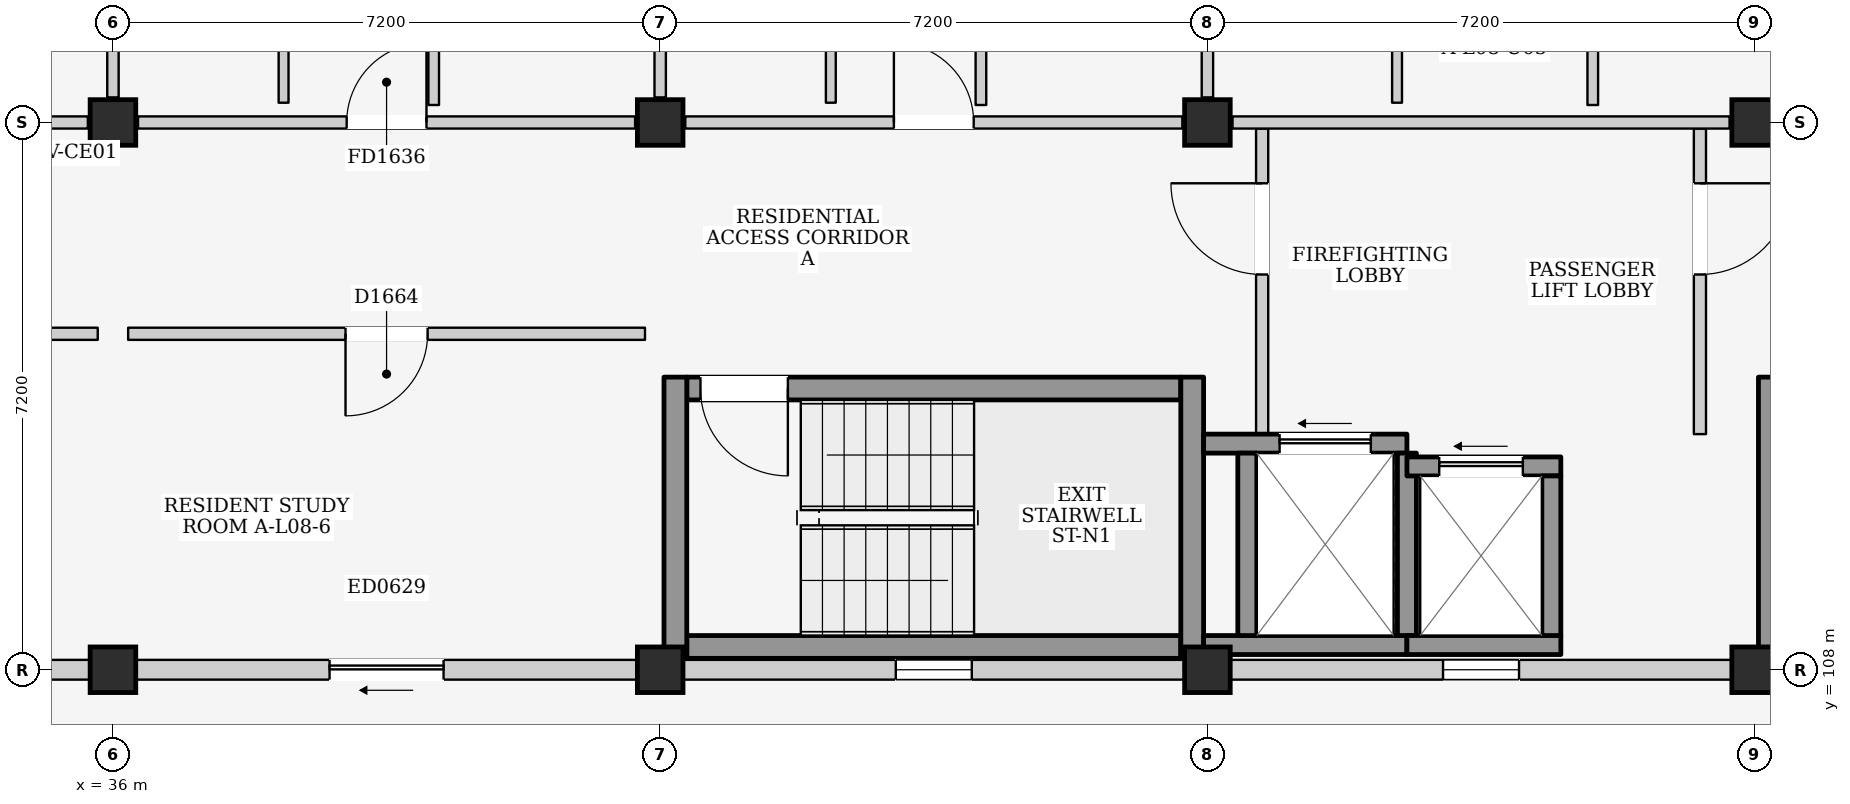
"""IFC4 building model, lengths in metres.
Left out: names, types, materials, properties, quantities, classifications, styles, units other than length and angle.
Written with IfcOpenShell. Run it as: python <this file> out.ifc"""

import sys

from ifc_helpers import new_model, si_unit, direction, frame, frame_2d, origin, origin_2d, place, context, subcontext, project, spatial, rectangle, extrude, element, fill, save


model = new_model("IFC4")
c1 = context("Model", 3, precision=1e-05, world=origin(), true_north=direction((0.0, 1.0)))
c2 = subcontext(c1, "Body", "Model", "MODEL_VIEW")
j1 = project(units=[si_unit("LENGTHUNIT", "METRE"), si_unit("PLANEANGLEUNIT", "RADIAN")], contexts=[c1])
p1 = place(None, origin())
s1 = spatial("IfcSite", under=j1, at=p1, CompositionType="ELEMENT")
p2 = place(p1, origin())
s2 = spatial("IfcBuilding", under=s1, at=p2, CompositionType="ELEMENT")
p3 = place(p2, frame((0.0, 0.0, 28.3)))
s3 = spatial("IfcBuildingStorey", under=s2, at=p3, CompositionType="ELEMENT", Elevation=28.3)
for number, where, z_axis, x_axis in (
    (1, (36.0, 108.0, 0.0), (0.0, 0.0, 1.0), (1.0, 0.0, 0.0)),
    (2, (36.0, 115.2, 0.0), (0.0, 0.0, 1.0), (1.0, 0.0, 0.0)),
    (3, (43.2, 108.0, 0.0), (0.0, 0.0, 1.0), (1.0, 0.0, 0.0)),
    (4, (43.2, 115.2, 0.0), (0.0, 0.0, 1.0), (1.0, 0.0, 0.0)),
    (5, (50.4, 108.0, 0.0), (0.0, 0.0, 1.0), (1.0, 0.0, 0.0)),
    (6, (50.4, 115.2, 0.0), (0.0, 0.0, 1.0), (1.0, 0.0, 0.0)),
    (7, (57.6, 108.0, 0.0), (0.0, 0.0, 1.0), (1.0, 0.0, 0.0)),
    (8, (57.6, 115.2, 0.0), (0.0, 0.0, 1.0), (1.0, 0.0, 0.0)),
):
    element("IfcColumn", number, at=place(p3, frame(where, z_axis=z_axis, x_axis=x_axis)), inside=s3, PredefinedType="COLUMN", context=c2, shape_type="SweptSolid", body=[
        extrude(rectangle(XDim=0.6, YDim=0.6, at=origin_2d()), origin(), (0.0, 0.0, 1.0), 3.2),
    ])
p4 = place(p3, frame((29.1, 108.0, 0.0), z_axis=(0.0, 0.0, 1.0), x_axis=(1.0, 0.0, 0.0)))
e9 = element("IfcWall", 9, at=p4, inside=s3, PredefinedType="ELEMENTEDWALL", context=c2, shape_type="SweptSolid", body=[
    extrude(rectangle(XDim=6.6, YDim=0.26, at=frame_2d((3.3, 0.0))), origin(), (0.0, 0.0, 1.0), 2.285),
])
p5 = place(p4, frame((2.55, 0.0, 0.0)))
e10 = element("IfcOpeningElement", 10, at=p5, cuts=e9, PredefinedType="OPENING", context=c2, shape_type="SweptSolid", body=[
    extrude(rectangle(XDim=1.5, YDim=2.12, at=frame_2d((0.75, 1.06))), frame((0.0, 0.145, 0.0), z_axis=(0.0, -1.0, 0.0), x_axis=(1.0, 0.0, 0.0)), (0.0, 0.0, 1.0), 0.29),
])
p6 = place(p3, frame((36.3, 108.0, 0.0), z_axis=(0.0, 0.0, 1.0), x_axis=(1.0, 0.0, 0.0)))
e11 = element("IfcWall", 11, at=p6, inside=s3, PredefinedType="ELEMENTEDWALL", context=c2, shape_type="SweptSolid", body=[
    extrude(rectangle(XDim=6.6, YDim=0.26, at=frame_2d((3.3, 0.0))), origin(), (0.0, 0.0, 1.0), 2.285),
])
p7 = place(p6, frame((2.55, 0.0, 0.0)))
e12 = element("IfcOpeningElement", 12, at=p7, cuts=e11, PredefinedType="OPENING", context=c2, shape_type="SweptSolid", body=[
    extrude(rectangle(XDim=1.5, YDim=2.12, at=frame_2d((0.75, 1.06))), frame((0.0, 0.145, 0.0), z_axis=(0.0, -1.0, 0.0), x_axis=(1.0, 0.0, 0.0)), (0.0, 0.0, 1.0), 0.29),
])
p8 = place(p3, frame((43.5, 108.0, 0.0), z_axis=(0.0, 0.0, 1.0), x_axis=(1.0, 0.0, 0.0)))
e13 = element("IfcWall", 13, at=p8, inside=s3, PredefinedType="ELEMENTEDWALL", context=c2, shape_type="SweptSolid", body=[
    extrude(rectangle(XDim=6.6, YDim=0.26, at=frame_2d((3.3, 0.0))), origin(), (0.0, 0.0, 1.0), 2.285),
])
p9 = place(p8, frame((2.8, 0.0, 1.2)))
e14 = element("IfcOpeningElement", 14, at=p9, cuts=e13, PredefinedType="OPENING", context=c2, shape_type="SweptSolid", body=[
    extrude(rectangle(XDim=1.0, YDim=0.9, at=frame_2d((0.5, 0.45))), frame((0.0, 0.145, 0.0), z_axis=(0.0, -1.0, 0.0), x_axis=(1.0, 0.0, 0.0)), (0.0, 0.0, 1.0), 0.29),
])
p10 = place(p3, frame((50.7, 108.0, 0.0), z_axis=(0.0, 0.0, 1.0), x_axis=(1.0, 0.0, 0.0)))
e15 = element("IfcWall", 15, at=p10, inside=s3, PredefinedType="ELEMENTEDWALL", context=c2, shape_type="SweptSolid", body=[
    extrude(rectangle(XDim=6.6, YDim=0.26, at=frame_2d((3.3, 0.0))), origin(), (0.0, 0.0, 1.0), 2.285),
])
p11 = place(p10, frame((2.8, 0.0, 1.2)))
e16 = element("IfcOpeningElement", 16, at=p11, cuts=e15, PredefinedType="OPENING", context=c2, shape_type="SweptSolid", body=[
    extrude(rectangle(XDim=1.0, YDim=0.9, at=frame_2d((0.5, 0.45))), frame((0.0, 0.145, 0.0), z_axis=(0.0, -1.0, 0.0), x_axis=(1.0, 0.0, 0.0)), (0.0, 0.0, 1.0), 0.29),
])
p12 = place(p3, frame((43.55, 108.3, 0.0), z_axis=(0.0, 0.0, 1.0), x_axis=(1.0, 0.0, 0.0)))
e17 = element("IfcWall", 17, at=p12, inside=s3, PredefinedType="SHEAR", context=c2, shape_type="SweptSolid", body=[
    extrude(rectangle(XDim=6.5, YDim=0.3, at=frame_2d((3.25, 0.0))), origin(), (0.0, 0.0, 1.0), 2.95),
])
p13 = place(p3, frame((43.55, 111.7, 0.0), z_axis=(0.0, 0.0, 1.0), x_axis=(1.0, 0.0, 0.0)))
e18 = element("IfcWall", 18, at=p13, inside=s3, PredefinedType="SHEAR", context=c2, shape_type="SweptSolid", body=[
    extrude(rectangle(XDim=6.5, YDim=0.3, at=frame_2d((3.25, 0.0))), origin(), (0.0, 0.0, 1.0), 2.95),
])
p14 = place(p13, frame((0.18, 0.0, 0.0)))
e19 = element("IfcOpeningElement", 19, at=p14, cuts=e18, PredefinedType="OPENING", context=c2, shape_type="SweptSolid", body=[
    extrude(rectangle(XDim=1.15, YDim=2.2, at=frame_2d((0.575, 1.1))), frame((0.0, 0.165, 0.0), z_axis=(0.0, -1.0, 0.0), x_axis=(1.0, 0.0, 0.0)), (0.0, 0.0, 1.0), 0.33),
])
for number, where, z_axis, x_axis in (
    (20, (43.4, 108.15, 0.0), (0.0, 0.0, 1.0), (0.0, 1.0, 0.0)),
    (21, (50.2, 108.15, 0.0), (0.0, 0.0, 1.0), (0.0, 1.0, 0.0)),
):
    element("IfcWall", number, at=place(p3, frame(where, z_axis=z_axis, x_axis=x_axis)), inside=s3, PredefinedType="SHEAR", context=c2, shape_type="SweptSolid", body=[
        extrude(rectangle(XDim=3.7, YDim=0.3, at=frame_2d((1.85, 0.0))), origin(), (0.0, 0.0, 1.0), 2.95),
    ])
p15 = place(p3, frame((51.12, 111.1, 0.0), z_axis=(0.0, 0.0, 1.0), x_axis=(0.0, 1.0, 0.0)))
e22 = element("IfcWall", 22, at=p15, inside=s3, PredefinedType="PARTITIONING", context=c2, shape_type="SweptSolid", body=[
    extrude(rectangle(XDim=4.02, YDim=0.16, at=frame_2d((2.01, 0.0))), origin(), (0.0, 0.0, 1.0), 2.95),
])
p16 = place(p15, frame((2.1, 0.0, 0.0)))
e23 = element("IfcOpeningElement", 23, at=p16, cuts=e22, PredefinedType="OPENING", context=c2, shape_type="SweptSolid", body=[
    extrude(rectangle(XDim=1.2, YDim=2.2, at=frame_2d((0.6, 1.1))), frame((0.0, 0.095, 0.0), z_axis=(0.0, -1.0, 0.0), x_axis=(1.0, 0.0, 0.0)), (0.0, 0.0, 1.0), 0.19),
])
p17 = place(p3, frame((56.88, 111.1, 0.0), z_axis=(0.0, 0.0, 1.0), x_axis=(0.0, 1.0, 0.0)))
e24 = element("IfcWall", 24, at=p17, inside=s3, PredefinedType="PARTITIONING", context=c2, shape_type="SweptSolid", body=[
    extrude(rectangle(XDim=4.02, YDim=0.16, at=frame_2d((2.01, 0.0))), origin(), (0.0, 0.0, 1.0), 2.95),
])
p18 = place(p17, frame((2.1, 0.0, 0.0)))
e25 = element("IfcOpeningElement", 25, at=p18, cuts=e24, PredefinedType="OPENING", context=c2, shape_type="SweptSolid", body=[
    extrude(rectangle(XDim=1.2, YDim=2.2, at=frame_2d((0.6, 1.1))), frame((0.0, 0.095, 0.0), z_axis=(0.0, -1.0, 0.0), x_axis=(1.0, 0.0, 0.0)), (0.0, 0.0, 1.0), 0.19),
])
p19 = place(p3, frame((50.35, 108.325, 0.0), z_axis=(0.0, 0.0, 1.0), x_axis=(1.0, 0.0, 0.0)))
e26 = element("IfcWall", 26, at=p19, inside=s3, PredefinedType="SHEAR", context=c2, shape_type="SweptSolid", body=[
    extrude(rectangle(XDim=2.675, YDim=0.25, at=frame_2d((1.337, 0.0))), origin(), (0.0, 0.0, 1.0), 2.95),
])
p20 = place(p3, frame((50.35, 110.975, 0.0), z_axis=(0.0, 0.0, 1.0), x_axis=(1.0, 0.0, 0.0)))
e27 = element("IfcWall", 27, at=p20, inside=s3, PredefinedType="SHEAR", context=c2, shape_type="SweptSolid", body=[
    extrude(rectangle(XDim=2.675, YDim=0.25, at=frame_2d((1.337, 0.0))), origin(), (0.0, 0.0, 1.0), 2.95),
])
p21 = place(p20, frame((1.0, 0.0, 0.0)))
e28 = element("IfcOpeningElement", 28, at=p21, cuts=e27, PredefinedType="OPENING", context=c2, shape_type="SweptSolid", body=[
    extrude(rectangle(XDim=1.2, YDim=2.25, at=frame_2d((0.6, 1.125))), frame((0.0, 0.14, 0.0), z_axis=(0.0, -1.0, 0.0), x_axis=(1.0, 0.0, 0.0)), (0.0, 0.0, 1.0), 0.28),
])
for number, where, z_axis, x_axis in (
    (29, (50.925, 108.45, 0.0), (0.0, 0.0, 1.0), (0.0, 1.0, 0.0)),
    (30, (53.025, 108.45, 0.0), (0.0, 0.0, 1.0), (0.0, 1.0, 0.0)),
):
    element("IfcWall", number, at=place(p3, frame(where, z_axis=z_axis, x_axis=x_axis)), inside=s3, PredefinedType="SHEAR", context=c2, shape_type="SweptSolid", body=[
        extrude(rectangle(XDim=2.4, YDim=0.25, at=frame_2d((1.2, 0.0))), origin(), (0.0, 0.0, 1.0), 2.95),
    ])
p22 = place(p3, frame((53.025, 108.325, 0.0), z_axis=(0.0, 0.0, 1.0), x_axis=(1.0, 0.0, 0.0)))
e31 = element("IfcWall", 31, at=p22, inside=s3, PredefinedType="SHEAR", context=c2, shape_type="SweptSolid", body=[
    extrude(rectangle(XDim=2.025, YDim=0.25, at=frame_2d((1.013, 0.0))), origin(), (0.0, 0.0, 1.0), 2.95),
])
p23 = place(p3, frame((53.025, 110.675, 0.0), z_axis=(0.0, 0.0, 1.0), x_axis=(1.0, 0.0, 0.0)))
e32 = element("IfcWall", 32, at=p23, inside=s3, PredefinedType="SHEAR", context=c2, shape_type="SweptSolid", body=[
    extrude(rectangle(XDim=2.025, YDim=0.25, at=frame_2d((1.013, 0.0))), origin(), (0.0, 0.0, 1.0), 2.95),
])
p24 = place(p23, frame((0.425, 0.0, 0.0)))
e33 = element("IfcOpeningElement", 33, at=p24, cuts=e32, PredefinedType="OPENING", context=c2, shape_type="SweptSolid", body=[
    extrude(rectangle(XDim=1.1, YDim=2.15, at=frame_2d((0.55, 1.075))), frame((0.0, 0.14, 0.0), z_axis=(0.0, -1.0, 0.0), x_axis=(1.0, 0.0, 0.0)), (0.0, 0.0, 1.0), 0.28),
])
p25 = place(p3, frame((54.925, 108.45, 0.0), z_axis=(0.0, 0.0, 1.0), x_axis=(0.0, 1.0, 0.0)))
e34 = element("IfcWall", 34, at=p25, inside=s3, PredefinedType="SHEAR", context=c2, shape_type="SweptSolid", body=[
    extrude(rectangle(XDim=2.1, YDim=0.25, at=frame_2d((1.05, 0.0))), origin(), (0.0, 0.0, 1.0), 2.95),
])
p26 = place(p3, frame((57.8, 108.15, 0.0), z_axis=(0.0, 0.0, 1.0), x_axis=(0.0, 1.0, 0.0)))
e35 = element("IfcWall", 35, at=p26, inside=s3, PredefinedType="SHEAR", context=c2, shape_type="SweptSolid", body=[
    extrude(rectangle(XDim=3.7, YDim=0.3, at=frame_2d((1.85, 0.0))), origin(), (0.0, 0.0, 1.0), 2.95),
])
p27 = place(p3, frame((29.13, 115.2, 0.0), z_axis=(0.0, 0.0, 1.0), x_axis=(1.0, 0.0, 0.0)))
e36 = element("IfcWall", 36, at=p27, inside=s3, PredefinedType="PARTITIONING", context=c2, shape_type="SweptSolid", body=[
    extrude(rectangle(XDim=6.54, YDim=0.16, at=frame_2d((3.27, 0.0))), origin(), (0.0, 0.0, 1.0), 2.285),
])
p28 = place(p3, frame((36.0, 115.53, 0.0), z_axis=(0.0, 0.0, 1.0), x_axis=(0.0, 1.0, 0.0)))
e37 = element("IfcWall", 37, at=p28, inside=s3, PredefinedType="PARTITIONING", context=c2, shape_type="SweptSolid", body=[
    extrude(rectangle(XDim=6.54, YDim=0.15, at=frame_2d((3.27, 0.0))), origin(), (0.0, 0.0, 1.0), 2.435),
])
p29 = place(p3, frame((36.33, 115.2, 0.0), z_axis=(0.0, 0.0, 1.0), x_axis=(1.0, 0.0, 0.0)))
e38 = element("IfcWall", 38, at=p29, inside=s3, PredefinedType="PARTITIONING", context=c2, shape_type="SweptSolid", body=[
    extrude(rectangle(XDim=6.54, YDim=0.16, at=frame_2d((3.27, 0.0))), origin(), (0.0, 0.0, 1.0), 2.285),
])
p30 = place(p29, frame((2.745, 0.0, 0.0)))
e39 = element("IfcOpeningElement", 39, at=p30, cuts=e38, PredefinedType="OPENING", context=c2, shape_type="SweptSolid", body=[
    extrude(rectangle(XDim=1.05, YDim=2.15, at=frame_2d((0.525, 1.075))), frame((0.0, 0.095, 0.0), z_axis=(0.0, -1.0, 0.0), x_axis=(1.0, 0.0, 0.0)), (0.0, 0.0, 1.0), 0.19),
])
p31 = place(p3, frame((43.2, 115.53, 0.0), z_axis=(0.0, 0.0, 1.0), x_axis=(0.0, 1.0, 0.0)))
e40 = element("IfcWall", 40, at=p31, inside=s3, PredefinedType="PARTITIONING", context=c2, shape_type="SweptSolid", body=[
    extrude(rectangle(XDim=6.54, YDim=0.15, at=frame_2d((3.27, 0.0))), origin(), (0.0, 0.0, 1.0), 2.435),
])
p32 = place(p3, frame((38.245, 115.46, 0.0), z_axis=(0.0, 0.0, 1.0), x_axis=(0.0, 1.0, 0.0)))
e41 = element("IfcWall", 41, at=p32, inside=s3, PredefinedType="PARTITIONING", context=c2, shape_type="SweptSolid", body=[
    extrude(rectangle(XDim=2.13, YDim=0.13, at=frame_2d((1.065, 0.0))), origin(), (0.0, 0.0, 1.0), 2.95),
])
p33 = place(p3, frame((40.22, 115.43, 0.0), z_axis=(0.0, 0.0, 1.0), x_axis=(0.0, 1.0, 0.0)))
e42 = element("IfcWall", 42, at=p33, inside=s3, PredefinedType="PARTITIONING", context=c2, shape_type="SweptSolid", body=[
    extrude(rectangle(XDim=2.15, YDim=0.14, at=frame_2d((1.075, 0.0))), origin(), (0.0, 0.0, 1.0), 2.95),
])
p34 = place(p3, frame((43.53, 115.2, 0.0), z_axis=(0.0, 0.0, 1.0), x_axis=(1.0, 0.0, 0.0)))
e43 = element("IfcWall", 43, at=p34, inside=s3, PredefinedType="PARTITIONING", context=c2, shape_type="SweptSolid", body=[
    extrude(rectangle(XDim=6.54, YDim=0.16, at=frame_2d((3.27, 0.0))), origin(), (0.0, 0.0, 1.0), 2.285),
])
p35 = place(p34, frame((2.745, 0.0, 0.0)))
e44 = element("IfcOpeningElement", 44, at=p35, cuts=e43, PredefinedType="OPENING", context=c2, shape_type="SweptSolid", body=[
    extrude(rectangle(XDim=1.05, YDim=2.15, at=frame_2d((0.525, 1.075))), frame((0.0, 0.095, 0.0), z_axis=(0.0, -1.0, 0.0), x_axis=(1.0, 0.0, 0.0)), (0.0, 0.0, 1.0), 0.19),
])
p36 = place(p3, frame((50.4, 115.53, 0.0), z_axis=(0.0, 0.0, 1.0), x_axis=(0.0, 1.0, 0.0)))
e45 = element("IfcWall", 45, at=p36, inside=s3, PredefinedType="PARTITIONING", context=c2, shape_type="SweptSolid", body=[
    extrude(rectangle(XDim=6.54, YDim=0.15, at=frame_2d((3.27, 0.0))), origin(), (0.0, 0.0, 1.0), 2.435),
])
p37 = place(p3, frame((45.445, 115.46, 0.0), z_axis=(0.0, 0.0, 1.0), x_axis=(0.0, 1.0, 0.0)))
e46 = element("IfcWall", 46, at=p37, inside=s3, PredefinedType="PARTITIONING", context=c2, shape_type="SweptSolid", body=[
    extrude(rectangle(XDim=2.13, YDim=0.13, at=frame_2d((1.065, 0.0))), origin(), (0.0, 0.0, 1.0), 2.95),
])
p38 = place(p3, frame((47.42, 115.43, 0.0), z_axis=(0.0, 0.0, 1.0), x_axis=(0.0, 1.0, 0.0)))
e47 = element("IfcWall", 47, at=p38, inside=s3, PredefinedType="PARTITIONING", context=c2, shape_type="SweptSolid", body=[
    extrude(rectangle(XDim=2.15, YDim=0.14, at=frame_2d((1.075, 0.0))), origin(), (0.0, 0.0, 1.0), 2.95),
])
p39 = place(p3, frame((50.73, 115.2, 0.0), z_axis=(0.0, 0.0, 1.0), x_axis=(1.0, 0.0, 0.0)))
e48 = element("IfcWall", 48, at=p39, inside=s3, PredefinedType="PARTITIONING", context=c2, shape_type="SweptSolid", body=[
    extrude(rectangle(XDim=6.54, YDim=0.16, at=frame_2d((3.27, 0.0))), origin(), (0.0, 0.0, 1.0), 2.285),
])
p40 = place(p3, frame((52.895, 115.46, 0.0), z_axis=(0.0, 0.0, 1.0), x_axis=(0.0, 1.0, 0.0)))
e49 = element("IfcWall", 49, at=p40, inside=s3, PredefinedType="PARTITIONING", context=c2, shape_type="SweptSolid", body=[
    extrude(rectangle(XDim=3.04, YDim=0.13, at=frame_2d((1.52, 0.0))), origin(), (0.0, 0.0, 1.0), 2.95),
])
p41 = place(p3, frame((55.47, 115.43, 0.0), z_axis=(0.0, 0.0, 1.0), x_axis=(0.0, 1.0, 0.0)))
e50 = element("IfcWall", 50, at=p41, inside=s3, PredefinedType="PARTITIONING", context=c2, shape_type="SweptSolid", body=[
    extrude(rectangle(XDim=3.06, YDim=0.14, at=frame_2d((1.53, 0.0))), origin(), (0.0, 0.0, 1.0), 2.95),
])
p42 = place(p3, frame((29.0, 112.42, 0.0), z_axis=(0.0, 0.0, 1.0), x_axis=(1.0, 0.0, 0.0)))
e51 = element("IfcWall", 51, at=p42, inside=s3, PredefinedType="PARTITIONING", context=c2, shape_type="SweptSolid", body=[
    extrude(rectangle(XDim=6.8, YDim=0.16, at=frame_2d((3.4, 0.0))), origin(), (0.0, 0.0, 1.0), 2.95),
])
p43 = place(p42, frame((2.86, 0.0, 0.0)))
e52 = element("IfcOpeningElement", 52, at=p43, cuts=e51, PredefinedType="OPENING", context=c2, shape_type="SweptSolid", body=[
    extrude(rectangle(XDim=1.08, YDim=2.22, at=frame_2d((0.54, 1.11))), frame((0.0, 0.095, 0.0), z_axis=(0.0, -1.0, 0.0), x_axis=(1.0, 0.0, 0.0)), (0.0, 0.0, 1.0), 0.19),
])
p44 = place(p3, frame((36.2, 112.42, 0.0), z_axis=(0.0, 0.0, 1.0), x_axis=(1.0, 0.0, 0.0)))
e53 = element("IfcWall", 53, at=p44, inside=s3, PredefinedType="PARTITIONING", context=c2, shape_type="SweptSolid", body=[
    extrude(rectangle(XDim=6.8, YDim=0.16, at=frame_2d((3.4, 0.0))), origin(), (0.0, 0.0, 1.0), 2.95),
])
p45 = place(p44, frame((2.86, 0.0, 0.0)))
e54 = element("IfcOpeningElement", 54, at=p45, cuts=e53, PredefinedType="OPENING", context=c2, shape_type="SweptSolid", body=[
    extrude(rectangle(XDim=1.08, YDim=2.22, at=frame_2d((0.54, 1.11))), frame((0.0, 0.095, 0.0), z_axis=(0.0, -1.0, 0.0), x_axis=(1.0, 0.0, 0.0)), (0.0, 0.0, 1.0), 0.19),
])
p46 = place(p7, frame((1.5, 0.0, 0.0), z_axis=(0.0, 0.0, 1.0), x_axis=(-1.0, 0.0, 0.0)))
e55 = element("IfcDoor", 55, at=p46, inside=s3, OperationType="SLIDING_TO_LEFT", PredefinedType="DOOR", context=c2, shape_type="SweptSolid", body=[
    extrude(rectangle(XDim=1.5, YDim=2.12, at=frame_2d((0.75, 1.06))), frame((0.0, 0.025, 0.0), z_axis=(0.0, -1.0, 0.0), x_axis=(1.0, 0.0, 0.0)), (0.0, 0.0, 1.0), 0.05),
])
fill(e12, e55)
p47 = place(p9, origin())
e56 = element("IfcWindow", 56, at=p47, inside=s3, PartitioningType="SINGLE_PANEL", PredefinedType="WINDOW", context=c2, shape_type="SweptSolid", body=[
    extrude(rectangle(XDim=1.0, YDim=0.9, at=frame_2d((0.5, 0.45))), frame((0.0, 0.03, 0.0), z_axis=(0.0, -1.0, 0.0), x_axis=(1.0, 0.0, 0.0)), (0.0, 0.0, 1.0), 0.06),
])
fill(e14, e56)
p48 = place(p11, origin())
e57 = element("IfcWindow", 57, at=p48, inside=s3, PartitioningType="SINGLE_PANEL", PredefinedType="WINDOW", context=c2, shape_type="SweptSolid", body=[
    extrude(rectangle(XDim=1.0, YDim=0.9, at=frame_2d((0.5, 0.45))), frame((0.0, 0.03, 0.0), z_axis=(0.0, -1.0, 0.0), x_axis=(1.0, 0.0, 0.0)), (0.0, 0.0, 1.0), 0.06),
])
fill(e16, e57)
p49 = place(p14, frame((1.15, 0.0, 0.0), z_axis=(0.0, 0.0, 1.0), x_axis=(-1.0, 0.0, 0.0)))
e58 = element("IfcDoor", 58, at=p49, inside=s3, OperationType="SINGLE_SWING_LEFT", PredefinedType="DOOR", context=c2, shape_type="SweptSolid", body=[
    extrude(rectangle(XDim=1.15, YDim=2.2, at=frame_2d((0.575, 1.1))), frame((0.0, 0.025, 0.0), z_axis=(0.0, -1.0, 0.0), x_axis=(1.0, 0.0, 0.0)), (0.0, 0.0, 1.0), 0.05),
])
fill(e19, e58)
p50 = place(p16, origin())
e59 = element("IfcDoor", 59, at=p50, inside=s3, OperationType="SINGLE_SWING_RIGHT", PredefinedType="DOOR", context=c2, shape_type="SweptSolid", body=[
    extrude(rectangle(XDim=1.2, YDim=2.2, at=frame_2d((0.6, 1.1))), frame((0.0, 0.025, 0.0), z_axis=(0.0, -1.0, 0.0), x_axis=(1.0, 0.0, 0.0)), (0.0, 0.0, 1.0), 0.05),
])
fill(e23, e59)
p51 = place(p18, frame((1.2, 0.0, 0.0), z_axis=(0.0, 0.0, 1.0), x_axis=(-1.0, 0.0, 0.0)))
e60 = element("IfcDoor", 60, at=p51, inside=s3, OperationType="SINGLE_SWING_LEFT", PredefinedType="DOOR", context=c2, shape_type="SweptSolid", body=[
    extrude(rectangle(XDim=1.2, YDim=2.2, at=frame_2d((0.6, 1.1))), frame((0.0, 0.025, 0.0), z_axis=(0.0, -1.0, 0.0), x_axis=(1.0, 0.0, 0.0)), (0.0, 0.0, 1.0), 0.05),
])
fill(e25, e60)
p52 = place(p21, origin())
e61 = element("IfcDoor", 61, at=p52, inside=s3, OperationType="SLIDING_TO_LEFT", PredefinedType="DOOR", context=c2, shape_type="SweptSolid", body=[
    extrude(rectangle(XDim=1.2, YDim=2.25, at=frame_2d((0.6, 1.125))), frame((0.0, 0.025, 0.0), z_axis=(0.0, -1.0, 0.0), x_axis=(1.0, 0.0, 0.0)), (0.0, 0.0, 1.0), 0.05),
])
fill(e28, e61)
p53 = place(p24, origin())
e62 = element("IfcDoor", 62, at=p53, inside=s3, OperationType="SLIDING_TO_LEFT", PredefinedType="DOOR", context=c2, shape_type="SweptSolid", body=[
    extrude(rectangle(XDim=1.1, YDim=2.15, at=frame_2d((0.55, 1.075))), frame((0.0, 0.025, 0.0), z_axis=(0.0, -1.0, 0.0), x_axis=(1.0, 0.0, 0.0)), (0.0, 0.0, 1.0), 0.05),
])
fill(e33, e62)
p54 = place(p30, origin())
e63 = element("IfcDoor", 63, at=p54, inside=s3, OperationType="SINGLE_SWING_RIGHT", PredefinedType="DOOR", context=c2, shape_type="SweptSolid", body=[
    extrude(rectangle(XDim=1.05, YDim=2.15, at=frame_2d((0.525, 1.075))), frame((0.0, 0.025, 0.0), z_axis=(0.0, -1.0, 0.0), x_axis=(1.0, 0.0, 0.0)), (0.0, 0.0, 1.0), 0.05),
])
fill(e39, e63)
p55 = place(p35, origin())
e64 = element("IfcDoor", 64, at=p55, inside=s3, OperationType="SINGLE_SWING_LEFT", PredefinedType="DOOR", context=c2, shape_type="SweptSolid", body=[
    extrude(rectangle(XDim=1.05, YDim=2.15, at=frame_2d((0.525, 1.075))), frame((0.0, 0.025, 0.0), z_axis=(0.0, -1.0, 0.0), x_axis=(1.0, 0.0, 0.0)), (0.0, 0.0, 1.0), 0.05),
])
fill(e44, e64)
p56 = place(p45, frame((1.08, 0.0, 0.0), z_axis=(0.0, 0.0, 1.0), x_axis=(-1.0, 0.0, 0.0)))
e65 = element("IfcDoor", 65, at=p56, inside=s3, OperationType="SINGLE_SWING_RIGHT", PredefinedType="DOOR", context=c2, shape_type="SweptSolid", body=[
    extrude(rectangle(XDim=1.08, YDim=2.22, at=frame_2d((0.54, 1.11))), frame((0.0, 0.025, 0.0), z_axis=(0.0, -1.0, 0.0), x_axis=(1.0, 0.0, 0.0)), (0.0, 0.0, 1.0), 0.05),
])
fill(e54, e65)
save(model, sys.argv[1])
